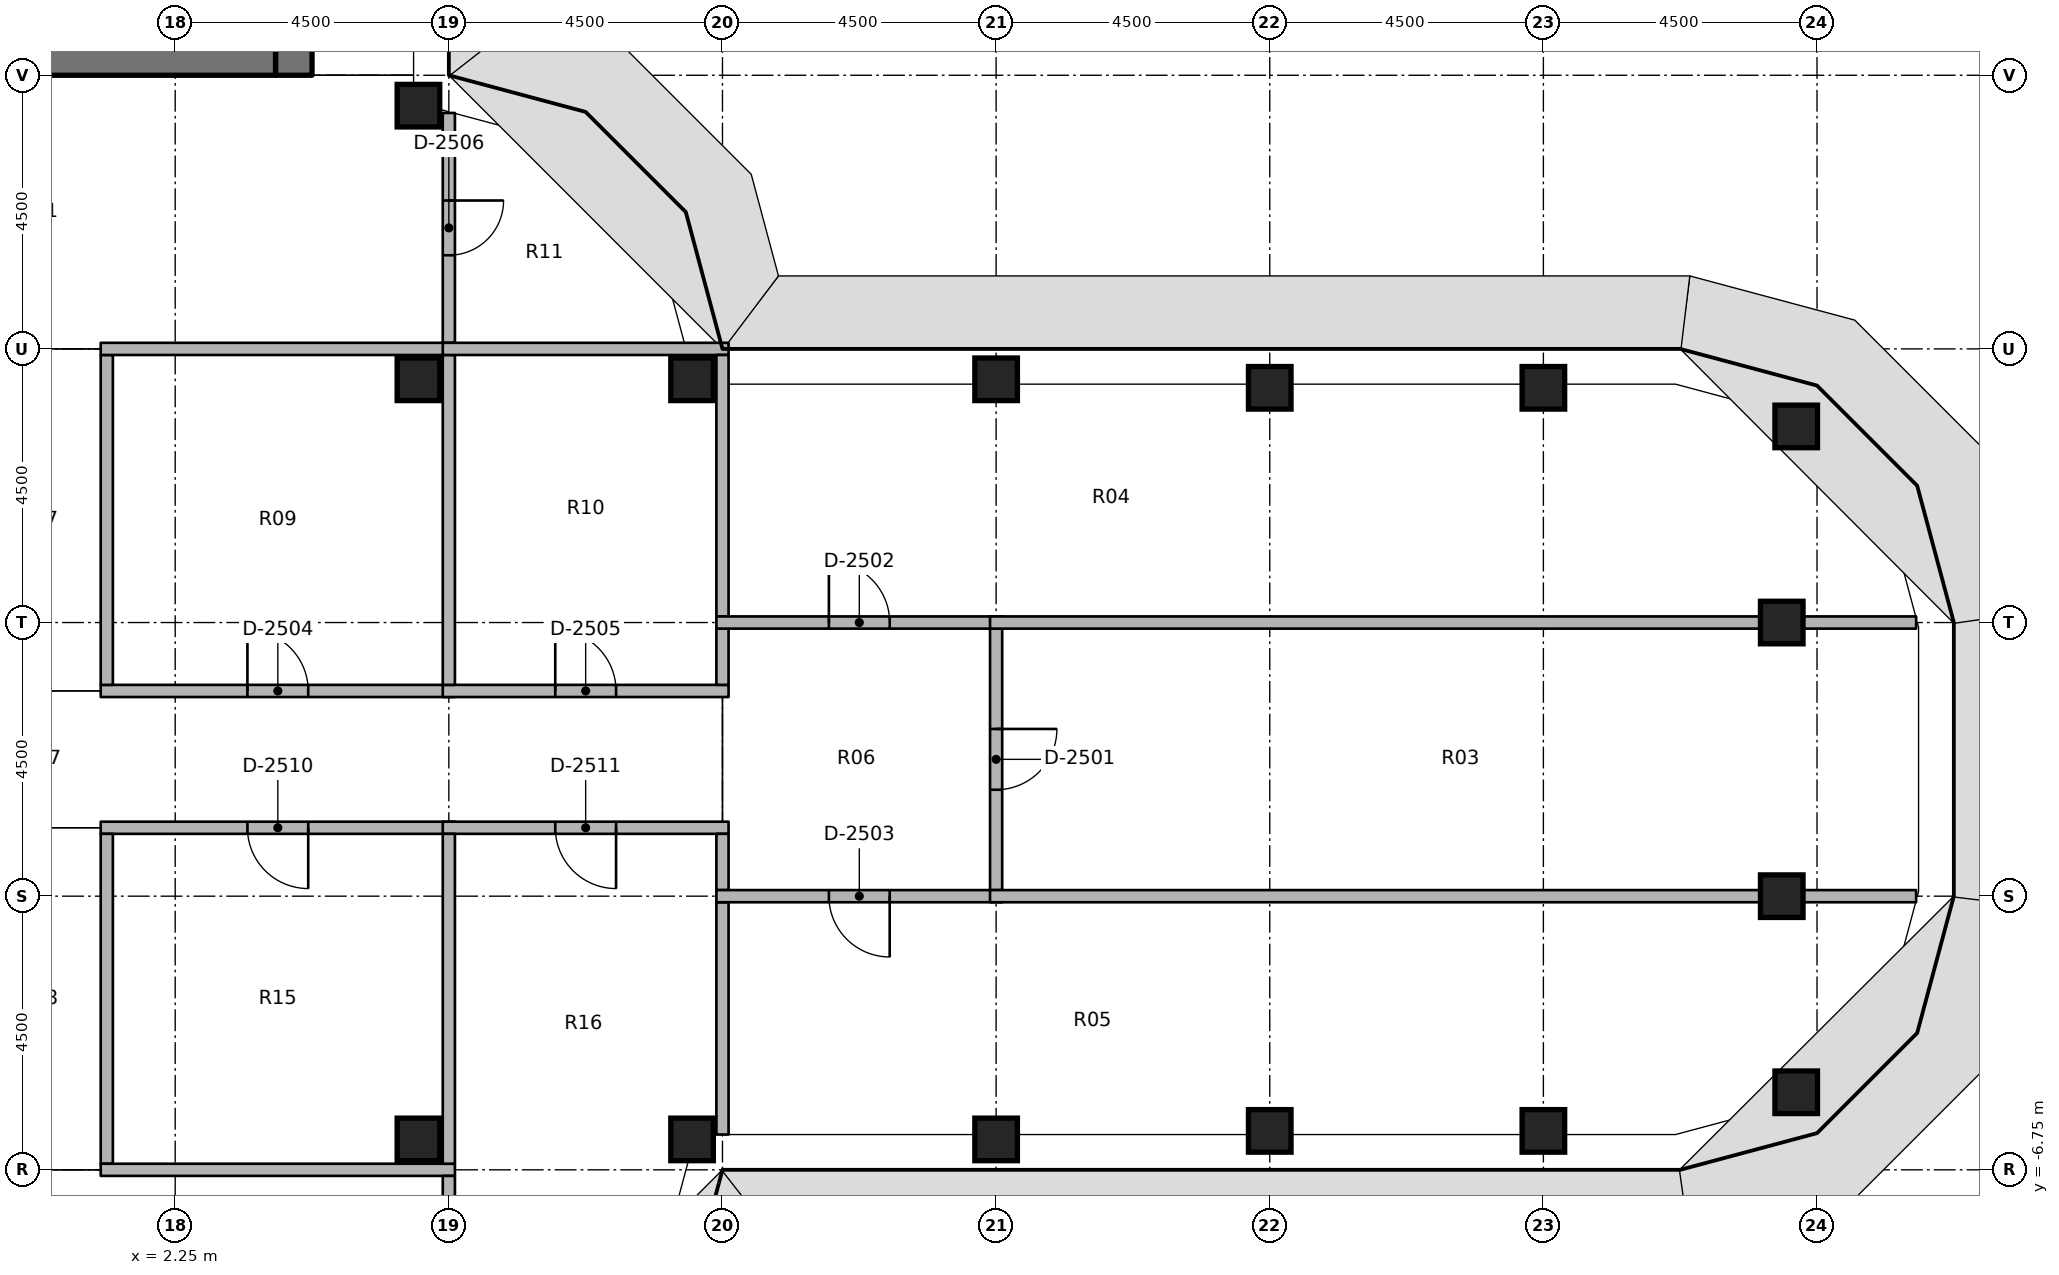
"""IFC4 building model, lengths in metres.
Left out: names, types, materials, properties, quantities, classifications, styles, units other than length and angle.
Written with IfcOpenShell. Run it as: python <this file> out.ifc"""

import sys

from ifc_helpers import new_model, si_unit, direction, frame, frame_2d, origin, origin_2d, place, context, subcontext, project, spatial, rectangle, extrude, element, fill, save


model = new_model("IFC4")
c1 = context("Model", 3, precision=1e-05, world=origin(), true_north=direction((0.0, 1.0)))
c2 = subcontext(c1, "Body", "Model", "MODEL_VIEW")
j1 = project(units=[si_unit("LENGTHUNIT", "METRE"), si_unit("PLANEANGLEUNIT", "RADIAN")], contexts=[c1])
p1 = place(None, origin())
s1 = spatial("IfcSite", under=j1, at=p1, CompositionType="ELEMENT")
p2 = place(p1, origin())
s2 = spatial("IfcBuilding", under=s1, at=p2, CompositionType="ELEMENT")
p3 = place(p2, frame((0.0, 0.0, 233.4)))
s3 = spatial("IfcBuildingStorey", under=s2, at=p3, CompositionType="ELEMENT", Elevation=233.4)
for number, where, z_axis, x_axis in (
    (1, (6.25, -6.25, 0.0), (0.0, 0.0, 1.0), (1.0, 0.0, 0.0)),
    (2, (6.25, 6.25, 0.0), (0.0, 0.0, 1.0), (1.0, 0.0, 0.0)),
    (3, (6.25, 10.75, 0.0), (0.0, 0.0, 1.0), (1.0, 0.0, 0.0)),
    (4, (10.75, -6.25, 0.0), (0.0, 0.0, 1.0), (1.0, 0.0, 0.0)),
    (5, (10.75, 6.25, 0.0), (0.0, 0.0, 1.0), (1.0, 0.0, 0.0)),
    (6, (15.75, -6.25, 0.0), (0.0, 0.0, 1.0), (1.0, 0.0, 0.0)),
    (7, (15.75, 6.25, 0.0), (0.0, 0.0, 1.0), (1.0, 0.0, 0.0)),
    (8, (20.25, -6.11, 0.0), (0.0, 0.0, 1.0), (1.0, 0.0, 0.0)),
    (9, (20.25, 6.11, 0.0), (0.0, 0.0, 1.0), (1.0, 0.0, 0.0)),
    (10, (24.75, -6.11, 0.0), (0.0, 0.0, 1.0), (1.0, 0.0, 0.0)),
    (11, (24.75, 6.11, 0.0), (0.0, 0.0, 1.0), (1.0, 0.0, 0.0)),
    (12, (28.908, -5.475, 0.0), (0.0, 0.0, 1.0), (1.0, 0.0, 0.0)),
    (13, (28.67, -2.25, 0.0), (0.0, 0.0, 1.0), (1.0, 0.0, 0.0)),
    (14, (28.67, 2.25, 0.0), (0.0, 0.0, 1.0), (1.0, 0.0, 0.0)),
    (15, (28.908, 5.475, 0.0), (0.0, 0.0, 1.0), (1.0, 0.0, 0.0)),
):
    element("IfcColumn", number, at=place(p3, frame(where, z_axis=z_axis, x_axis=x_axis)), inside=s3, PredefinedType="COLUMN", context=c2, shape_type="SweptSolid", body=[
        extrude(rectangle(XDim=0.7, YDim=0.7, at=origin_2d()), origin(), (0.0, 0.0, 1.0), 3.65),
    ])
p4 = place(p3, frame((4.2, 11.25, 0.0), z_axis=(0.0, 0.0, 1.0), x_axis=(0.0, 1.0, 0.0)))
e16 = element("IfcWall", 16, at=p4, inside=s3, PredefinedType="SHEAR", context=c2, shape_type="SweptSolid", body=[
    extrude(rectangle(XDim=15.0, YDim=0.6, at=frame_2d((7.5, 0.0))), origin(), (0.0, 0.0, 1.0), 3.8),
])
p5 = place(p4, frame((7.15, 0.0, 0.0)))
e17 = element("IfcOpeningElement", 17, at=p5, cuts=e16, PredefinedType="OPENING", context=c2, shape_type="SweptSolid", body=[
    extrude(rectangle(XDim=1.5, YDim=2.3, at=frame_2d((0.75, 1.15))), frame((0.0, 0.31, 0.0), z_axis=(0.0, -1.0, 0.0), x_axis=(1.0, 0.0, 0.0)), (0.0, 0.0, 1.0), 0.62),
])
p6 = place(p4, frame((5.55, 0.0, 0.0)))
e18 = element("IfcOpeningElement", 18, at=p6, cuts=e16, PredefinedType="OPENING", context=c2, shape_type="SweptSolid", body=[
    extrude(rectangle(XDim=1.2, YDim=2.1, at=frame_2d((0.6, 1.05))), frame((0.0, 0.31, 0.0), z_axis=(0.0, -1.0, 0.0), x_axis=(1.0, 0.0, 0.0)), (0.0, 0.0, 1.0), 0.62),
])
p7 = place(p3, frame((-3.9, 11.55, 0.0), z_axis=(0.0, 0.0, 1.0), x_axis=(1.0, 0.0, 0.0)))
e19 = element("IfcWall", 19, at=p7, inside=s3, PredefinedType="SHEAR", context=c2, shape_type="SweptSolid", body=[
    extrude(rectangle(XDim=7.8, YDim=0.6, at=frame_2d((3.9, 0.0))), origin(), (0.0, 0.0, 1.0), 3.8),
])
p8 = place(p3, frame((1.025, 1.125, 0.0), z_axis=(0.0, 0.0, 1.0), x_axis=(1.0, 0.0, 0.0)))
e20 = element("IfcWall", 20, at=p8, inside=s3, PredefinedType="PARTITIONING", context=c2, shape_type="SweptSolid", body=[
    extrude(rectangle(XDim=5.825, YDim=0.2, at=frame_2d((2.913, 0.0))), origin(), (0.0, 0.0, 1.0), 2.746),
])
p9 = place(p8, frame((2.413, 0.0, 0.0)))
e21 = element("IfcOpeningElement", 21, at=p9, cuts=e20, PredefinedType="OPENING", context=c2, shape_type="SweptSolid", body=[
    extrude(rectangle(XDim=1.0, YDim=2.1, at=frame_2d((0.5, 1.05))), frame((0.0, 0.11, 0.0), z_axis=(0.0, -1.0, 0.0), x_axis=(1.0, 0.0, 0.0)), (0.0, 0.0, 1.0), 0.22),
])
p10 = place(p3, frame((6.65, 1.125, 0.0), z_axis=(0.0, 0.0, 1.0), x_axis=(1.0, 0.0, 0.0)))
e22 = element("IfcWall", 22, at=p10, inside=s3, PredefinedType="PARTITIONING", context=c2, shape_type="SweptSolid", body=[
    extrude(rectangle(XDim=4.7, YDim=0.2, at=frame_2d((2.35, 0.0))), origin(), (0.0, 0.0, 1.0), 2.746),
])
p11 = place(p10, frame((1.85, 0.0, 0.0)))
e23 = element("IfcOpeningElement", 23, at=p11, cuts=e22, PredefinedType="OPENING", context=c2, shape_type="SweptSolid", body=[
    extrude(rectangle(XDim=1.0, YDim=2.1, at=frame_2d((0.5, 1.05))), frame((0.0, 0.11, 0.0), z_axis=(0.0, -1.0, 0.0), x_axis=(1.0, 0.0, 0.0)), (0.0, 0.0, 1.0), 0.22),
])
p12 = place(p3, frame((6.85, -1.125, 0.0), z_axis=(0.0, 0.0, 1.0), x_axis=(-1.0, 0.0, 0.0)))
e24 = element("IfcWall", 24, at=p12, inside=s3, PredefinedType="PARTITIONING", context=c2, shape_type="SweptSolid", body=[
    extrude(rectangle(XDim=5.825, YDim=0.2, at=frame_2d((2.913, 0.0))), origin(), (0.0, 0.0, 1.0), 2.746),
])
p13 = place(p12, frame((2.413, 0.0, 0.0)))
e25 = element("IfcOpeningElement", 25, at=p13, cuts=e24, PredefinedType="OPENING", context=c2, shape_type="SweptSolid", body=[
    extrude(rectangle(XDim=1.0, YDim=2.1, at=frame_2d((0.5, 1.05))), frame((0.0, 0.11, 0.0), z_axis=(0.0, -1.0, 0.0), x_axis=(1.0, 0.0, 0.0)), (0.0, 0.0, 1.0), 0.22),
])
p14 = place(p3, frame((11.35, -1.125, 0.0), z_axis=(0.0, 0.0, 1.0), x_axis=(-1.0, 0.0, 0.0)))
e26 = element("IfcWall", 26, at=p14, inside=s3, PredefinedType="PARTITIONING", context=c2, shape_type="SweptSolid", body=[
    extrude(rectangle(XDim=4.7, YDim=0.2, at=frame_2d((2.35, 0.0))), origin(), (0.0, 0.0, 1.0), 2.746),
])
p15 = place(p14, frame((1.85, 0.0, 0.0)))
e27 = element("IfcOpeningElement", 27, at=p15, cuts=e26, PredefinedType="OPENING", context=c2, shape_type="SweptSolid", body=[
    extrude(rectangle(XDim=1.0, YDim=2.1, at=frame_2d((0.5, 1.05))), frame((0.0, 0.11, 0.0), z_axis=(0.0, -1.0, 0.0), x_axis=(1.0, 0.0, 0.0)), (0.0, 0.0, 1.0), 0.22),
])
for number, where, z_axis, x_axis in (
    (28, (1.125, 1.225, 0.0), (0.0, 0.0, 1.0), (0.0, 1.0, 0.0)),
    (29, (1.125, -6.65, 0.0), (0.0, 0.0, 1.0), (0.0, 1.0, 0.0)),
):
    element("IfcWall", number, at=place(p3, frame(where, z_axis=z_axis, x_axis=x_axis)), inside=s3, PredefinedType="PARTITIONING", context=c2, shape_type="SweptSolid", body=[
        extrude(rectangle(XDim=5.425, YDim=0.2, at=frame_2d((2.712, 0.0))), origin(), (0.0, 0.0, 1.0), 2.746),
    ])
p16 = place(p3, frame((1.025, 6.75, 0.0), z_axis=(0.0, 0.0, 1.0), x_axis=(1.0, 0.0, 0.0)))
e30 = element("IfcWall", 30, at=p16, inside=s3, PredefinedType="PARTITIONING", context=c2, shape_type="SweptSolid", body=[
    extrude(rectangle(XDim=5.825, YDim=0.2, at=frame_2d((2.913, 0.0))), origin(), (0.0, 0.0, 1.0), 2.746),
])
p17 = place(p3, frame((6.75, 10.63, 0.0), z_axis=(0.0, 0.0, 1.0), x_axis=(0.0, -1.0, 0.0)))
e31 = element("IfcWall", 31, at=p17, inside=s3, PredefinedType="PARTITIONING", context=c2, shape_type="SweptSolid", body=[
    extrude(rectangle(XDim=3.78, YDim=0.2, at=frame_2d((1.89, 0.0))), origin(), (0.0, 0.0, 1.0), 2.746),
])
p18 = place(p17, frame((1.44, 0.0, 0.0)))
e32 = element("IfcOpeningElement", 32, at=p18, cuts=e31, PredefinedType="OPENING", context=c2, shape_type="SweptSolid", body=[
    extrude(rectangle(XDim=0.9, YDim=2.1, at=frame_2d((0.45, 1.05))), frame((0.0, 0.11, 0.0), z_axis=(0.0, -1.0, 0.0), x_axis=(1.0, 0.0, 0.0)), (0.0, 0.0, 1.0), 0.22),
])
p19 = place(p3, frame((1.025, -6.75, 0.0), z_axis=(0.0, 0.0, 1.0), x_axis=(1.0, 0.0, 0.0)))
e33 = element("IfcWall", 33, at=p19, inside=s3, PredefinedType="PARTITIONING", context=c2, shape_type="SweptSolid", body=[
    extrude(rectangle(XDim=5.825, YDim=0.2, at=frame_2d((2.913, 0.0))), origin(), (0.0, 0.0, 1.0), 2.746),
])
p20 = place(p3, frame((6.75, -10.63, 0.0), z_axis=(0.0, 0.0, 1.0), x_axis=(0.0, 1.0, 0.0)))
e34 = element("IfcWall", 34, at=p20, inside=s3, PredefinedType="PARTITIONING", context=c2, shape_type="SweptSolid", body=[
    extrude(rectangle(XDim=3.78, YDim=0.2, at=frame_2d((1.89, 0.0))), origin(), (0.0, 0.0, 1.0), 2.746),
])
p21 = place(p3, frame((6.75, 1.225, 0.0), z_axis=(0.0, 0.0, 1.0), x_axis=(0.0, 1.0, 0.0)))
e35 = element("IfcWall", 35, at=p21, inside=s3, PredefinedType="PARTITIONING", context=c2, shape_type="SweptSolid", body=[
    extrude(rectangle(XDim=5.425, YDim=0.2, at=frame_2d((2.712, 0.0))), origin(), (0.0, 0.0, 1.0), 2.746),
])
p22 = place(p3, frame((6.65, 6.75, 0.0), z_axis=(0.0, 0.0, 1.0), x_axis=(1.0, 0.0, 0.0)))
e36 = element("IfcWall", 36, at=p22, inside=s3, PredefinedType="PARTITIONING", context=c2, shape_type="SweptSolid", body=[
    extrude(rectangle(XDim=4.7, YDim=0.2, at=frame_2d((2.35, 0.0))), origin(), (0.0, 0.0, 1.0), 2.746),
])
p23 = place(p3, frame((11.25, 1.225, 0.0), z_axis=(0.0, 0.0, 1.0), x_axis=(0.0, 1.0, 0.0)))
e37 = element("IfcWall", 37, at=p23, inside=s3, PredefinedType="PARTITIONING", context=c2, shape_type="SweptSolid", body=[
    extrude(rectangle(XDim=0.925, YDim=0.2, at=frame_2d((0.462, 0.0))), origin(), (0.0, 0.0, 1.0), 2.746),
])
p24 = place(p3, frame((11.25, 2.35, 0.0), z_axis=(0.0, 0.0, 1.0), x_axis=(0.0, 1.0, 0.0)))
e38 = element("IfcWall", 38, at=p24, inside=s3, PredefinedType="PARTITIONING", context=c2, shape_type="SweptSolid", body=[
    extrude(rectangle(XDim=4.3, YDim=0.2, at=frame_2d((2.15, 0.0))), origin(), (0.0, 0.0, 1.0), 2.746),
])
p25 = place(p3, frame((6.75, -6.65, 0.0), z_axis=(0.0, 0.0, 1.0), x_axis=(0.0, 1.0, 0.0)))
e39 = element("IfcWall", 39, at=p25, inside=s3, PredefinedType="PARTITIONING", context=c2, shape_type="SweptSolid", body=[
    extrude(rectangle(XDim=5.425, YDim=0.2, at=frame_2d((2.712, 0.0))), origin(), (0.0, 0.0, 1.0), 2.746),
])
p26 = place(p3, frame((11.25, -2.15, 0.0), z_axis=(0.0, 0.0, 1.0), x_axis=(0.0, 1.0, 0.0)))
e40 = element("IfcWall", 40, at=p26, inside=s3, PredefinedType="PARTITIONING", context=c2, shape_type="SweptSolid", body=[
    extrude(rectangle(XDim=0.925, YDim=0.2, at=frame_2d((0.462, 0.0))), origin(), (0.0, 0.0, 1.0), 2.746),
])
p27 = place(p3, frame((11.25, -6.17, 0.0), z_axis=(0.0, 0.0, 1.0), x_axis=(0.0, 1.0, 0.0)))
e41 = element("IfcWall", 41, at=p27, inside=s3, PredefinedType="PARTITIONING", context=c2, shape_type="SweptSolid", body=[
    extrude(rectangle(XDim=3.82, YDim=0.2, at=frame_2d((1.91, 0.0))), origin(), (0.0, 0.0, 1.0), 2.746),
])
p28 = place(p3, frame((11.15, 2.25, 0.0), z_axis=(0.0, 0.0, 1.0), x_axis=(1.0, 0.0, 0.0)))
e42 = element("IfcWall", 42, at=p28, inside=s3, PredefinedType="PARTITIONING", context=c2, shape_type="SweptSolid", body=[
    extrude(rectangle(XDim=4.7, YDim=0.2, at=frame_2d((2.35, 0.0))), origin(), (0.0, 0.0, 1.0), 2.746),
])
p29 = place(p28, frame((1.85, 0.0, 0.0)))
e43 = element("IfcOpeningElement", 43, at=p29, cuts=e42, PredefinedType="OPENING", context=c2, shape_type="SweptSolid", body=[
    extrude(rectangle(XDim=1.0, YDim=2.1, at=frame_2d((0.5, 1.05))), frame((0.0, 0.11, 0.0), z_axis=(0.0, -1.0, 0.0), x_axis=(1.0, 0.0, 0.0)), (0.0, 0.0, 1.0), 0.22),
])
p30 = place(p3, frame((15.85, -2.25, 0.0), z_axis=(0.0, 0.0, 1.0), x_axis=(-1.0, 0.0, 0.0)))
e44 = element("IfcWall", 44, at=p30, inside=s3, PredefinedType="PARTITIONING", context=c2, shape_type="SweptSolid", body=[
    extrude(rectangle(XDim=4.7, YDim=0.2, at=frame_2d((2.35, 0.0))), origin(), (0.0, 0.0, 1.0), 2.746),
])
p31 = place(p30, frame((1.85, 0.0, 0.0)))
e45 = element("IfcOpeningElement", 45, at=p31, cuts=e44, PredefinedType="OPENING", context=c2, shape_type="SweptSolid", body=[
    extrude(rectangle(XDim=1.0, YDim=2.1, at=frame_2d((0.5, 1.05))), frame((0.0, 0.11, 0.0), z_axis=(0.0, -1.0, 0.0), x_axis=(1.0, 0.0, 0.0)), (0.0, 0.0, 1.0), 0.22),
])
p32 = place(p3, frame((15.75, 2.15, 0.0), z_axis=(0.0, 0.0, 1.0), x_axis=(0.0, -1.0, 0.0)))
e46 = element("IfcWall", 46, at=p32, inside=s3, PredefinedType="PARTITIONING", context=c2, shape_type="SweptSolid", body=[
    extrude(rectangle(XDim=4.3, YDim=0.2, at=frame_2d((2.15, 0.0))), origin(), (0.0, 0.0, 1.0), 2.746),
])
p33 = place(p32, frame((1.65, 0.0, 0.0)))
e47 = element("IfcOpeningElement", 47, at=p33, cuts=e46, PredefinedType="OPENING", context=c2, shape_type="SweptSolid", body=[
    extrude(rectangle(XDim=1.0, YDim=2.1, at=frame_2d((0.5, 1.05))), frame((0.0, 0.11, 0.0), z_axis=(0.0, -1.0, 0.0), x_axis=(1.0, 0.0, 0.0)), (0.0, 0.0, 1.0), 0.22),
])
p34 = place(p3, frame((15.65, 2.25, 0.0), z_axis=(0.0, 0.0, 1.0), x_axis=(1.0, 0.0, 0.0)))
e48 = element("IfcWall", 48, at=p34, inside=s3, PredefinedType="PARTITIONING", context=c2, shape_type="SweptSolid", body=[
    extrude(rectangle(XDim=12.67, YDim=0.2, at=frame_2d((6.335, 0.0))), origin(), (0.0, 0.0, 1.0), 2.746),
])
p35 = place(p3, frame((29.02, 2.25, 0.0), z_axis=(0.0, 0.0, 1.0), x_axis=(1.0, 0.0, 0.0)))
e49 = element("IfcWall", 49, at=p35, inside=s3, PredefinedType="PARTITIONING", context=c2, shape_type="SweptSolid", body=[
    extrude(rectangle(XDim=1.86, YDim=0.2, at=frame_2d((0.93, 0.0))), origin(), (0.0, 0.0, 1.0), 2.746),
])
p36 = place(p3, frame((15.65, -2.25, 0.0), z_axis=(0.0, 0.0, 1.0), x_axis=(1.0, 0.0, 0.0)))
e50 = element("IfcWall", 50, at=p36, inside=s3, PredefinedType="PARTITIONING", context=c2, shape_type="SweptSolid", body=[
    extrude(rectangle(XDim=12.67, YDim=0.2, at=frame_2d((6.335, 0.0))), origin(), (0.0, 0.0, 1.0), 2.746),
])
p37 = place(p3, frame((29.02, -2.25, 0.0), z_axis=(0.0, 0.0, 1.0), x_axis=(1.0, 0.0, 0.0)))
e51 = element("IfcWall", 51, at=p37, inside=s3, PredefinedType="PARTITIONING", context=c2, shape_type="SweptSolid", body=[
    extrude(rectangle(XDim=1.86, YDim=0.2, at=frame_2d((0.93, 0.0))), origin(), (0.0, 0.0, 1.0), 2.746),
])
p38 = place(p33, origin())
e52 = element("IfcDoor", 52, at=p38, inside=s3, OperationType="SINGLE_SWING_RIGHT", PredefinedType="DOOR", context=c2, shape_type="SweptSolid", body=[
    extrude(rectangle(XDim=1.0, YDim=2.1, at=frame_2d((0.5, 1.05))), frame((0.0, 0.025, 0.0), z_axis=(0.0, -1.0, 0.0), x_axis=(1.0, 0.0, 0.0)), (0.0, 0.0, 1.0), 0.05),
])
fill(e47, e52)
p39 = place(p29, origin())
e53 = element("IfcDoor", 53, at=p39, inside=s3, OperationType="SINGLE_SWING_RIGHT", PredefinedType="DOOR", context=c2, shape_type="SweptSolid", body=[
    extrude(rectangle(XDim=1.0, YDim=2.1, at=frame_2d((0.5, 1.05))), frame((0.0, 0.025, 0.0), z_axis=(0.0, -1.0, 0.0), x_axis=(1.0, 0.0, 0.0)), (0.0, 0.0, 1.0), 0.05),
])
fill(e43, e53)
p40 = place(p31, origin())
e54 = element("IfcDoor", 54, at=p40, inside=s3, OperationType="SINGLE_SWING_RIGHT", PredefinedType="DOOR", context=c2, shape_type="SweptSolid", body=[
    extrude(rectangle(XDim=1.0, YDim=2.1, at=frame_2d((0.5, 1.05))), frame((0.0, 0.025, 0.0), z_axis=(0.0, -1.0, 0.0), x_axis=(1.0, 0.0, 0.0)), (0.0, 0.0, 1.0), 0.05),
])
fill(e45, e54)
p41 = place(p9, origin())
e55 = element("IfcDoor", 55, at=p41, inside=s3, OperationType="SINGLE_SWING_RIGHT", PredefinedType="DOOR", context=c2, shape_type="SweptSolid", body=[
    extrude(rectangle(XDim=1.0, YDim=2.1, at=frame_2d((0.5, 1.05))), frame((0.0, 0.025, 0.0), z_axis=(0.0, -1.0, 0.0), x_axis=(1.0, 0.0, 0.0)), (0.0, 0.0, 1.0), 0.05),
])
fill(e21, e55)
p42 = place(p11, origin())
e56 = element("IfcDoor", 56, at=p42, inside=s3, OperationType="SINGLE_SWING_RIGHT", PredefinedType="DOOR", context=c2, shape_type="SweptSolid", body=[
    extrude(rectangle(XDim=1.0, YDim=2.1, at=frame_2d((0.5, 1.05))), frame((0.0, 0.025, 0.0), z_axis=(0.0, -1.0, 0.0), x_axis=(1.0, 0.0, 0.0)), (0.0, 0.0, 1.0), 0.05),
])
fill(e23, e56)
p43 = place(p18, origin())
e57 = element("IfcDoor", 57, at=p43, inside=s3, OperationType="SINGLE_SWING_RIGHT", PredefinedType="DOOR", context=c2, shape_type="SweptSolid", body=[
    extrude(rectangle(XDim=0.9, YDim=2.1, at=frame_2d((0.45, 1.05))), frame((0.0, 0.025, 0.0), z_axis=(0.0, -1.0, 0.0), x_axis=(1.0, 0.0, 0.0)), (0.0, 0.0, 1.0), 0.05),
])
fill(e32, e57)
p44 = place(p13, origin())
e58 = element("IfcDoor", 58, at=p44, inside=s3, OperationType="SINGLE_SWING_RIGHT", PredefinedType="DOOR", context=c2, shape_type="SweptSolid", body=[
    extrude(rectangle(XDim=1.0, YDim=2.1, at=frame_2d((0.5, 1.05))), frame((0.0, 0.025, 0.0), z_axis=(0.0, -1.0, 0.0), x_axis=(1.0, 0.0, 0.0)), (0.0, 0.0, 1.0), 0.05),
])
fill(e25, e58)
p45 = place(p15, origin())
e59 = element("IfcDoor", 59, at=p45, inside=s3, OperationType="SINGLE_SWING_RIGHT", PredefinedType="DOOR", context=c2, shape_type="SweptSolid", body=[
    extrude(rectangle(XDim=1.0, YDim=2.1, at=frame_2d((0.5, 1.05))), frame((0.0, 0.025, 0.0), z_axis=(0.0, -1.0, 0.0), x_axis=(1.0, 0.0, 0.0)), (0.0, 0.0, 1.0), 0.05),
])
fill(e27, e59)
save(model, sys.argv[1])
